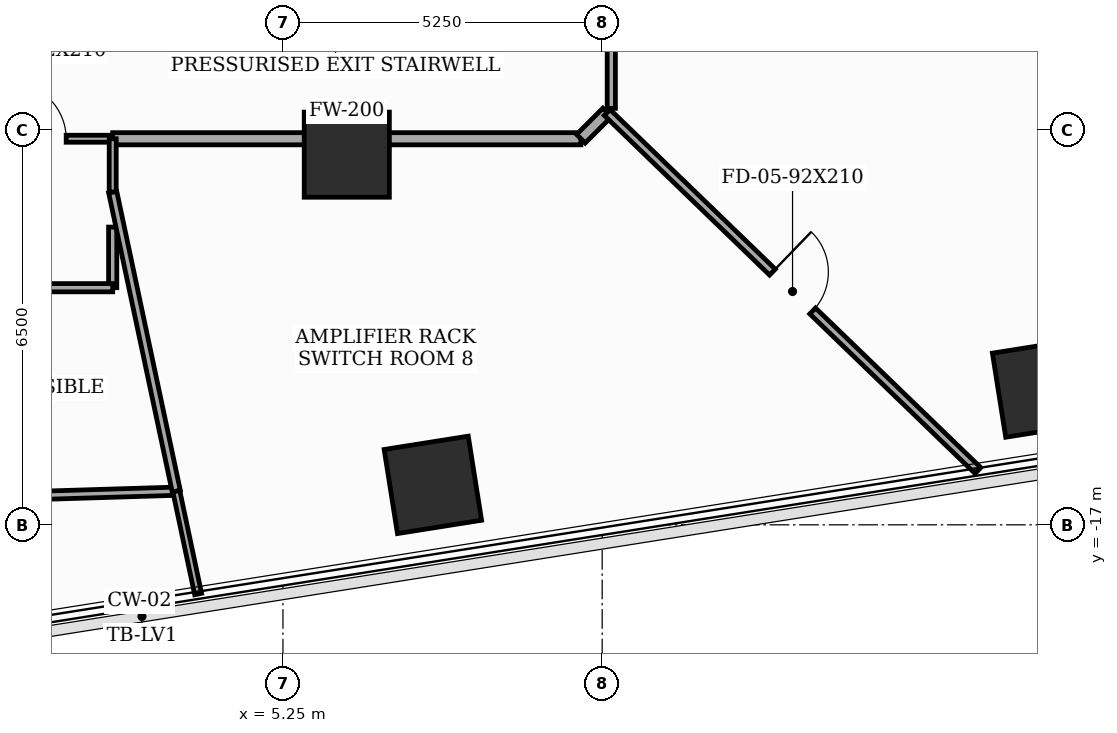
"""IFC4 building model, lengths in metres.
Left out: names, types, materials, properties, quantities, classifications, styles, units other than length and angle.
Written with IfcOpenShell. Run it as: python <this file> out.ifc"""

import sys

from ifc_helpers import new_model, si_unit, direction, frame, frame_2d, origin, origin_2d, place, context, subcontext, project, spatial, rectangle, extrude, element, fill, save


model = new_model("IFC4")
c1 = context("Model", 3, precision=1e-05, world=origin(), true_north=direction((0.0, 1.0)))
c2 = subcontext(c1, "Body", "Model", "MODEL_VIEW")
j1 = project(units=[si_unit("LENGTHUNIT", "METRE"), si_unit("PLANEANGLEUNIT", "RADIAN")], contexts=[c1])
p1 = place(None, origin())
s1 = spatial("IfcSite", under=j1, at=p1, CompositionType="ELEMENT")
p2 = place(p1, origin())
s2 = spatial("IfcBuilding", under=s1, at=p2, CompositionType="ELEMENT")
p3 = place(p2, frame((0.0, 0.0, 74.1)))
s3 = spatial("IfcBuildingStorey", under=s2, at=p3, CompositionType="ELEMENT", Elevation=74.1)
for number, where, z_axis, x_axis in (
    (1, (6.3, -10.912, 0.0), (0.0, 0.0, 1.0), (1.0, 0.0, 0.0)),
    (2, (7.716, -16.343, 0.0), (0.0, 0.0, 1.0), (0.988, 0.156, 0.0)),
    (3, (17.719, -14.758, 0.0), (0.0, 0.0, 1.0), (0.988, 0.156, 0.0)),
):
    element("IfcColumn", number, at=place(p3, frame(where, z_axis=z_axis, x_axis=x_axis)), inside=s3, PredefinedType="COLUMN", context=c2, shape_type="SweptSolid", body=[
        extrude(rectangle(XDim=1.4, YDim=1.4, at=origin_2d()), origin(), (0.0, 0.0, 1.0), 3.7),
    ])
p4 = place(p3, frame((10.65, -10.15, 0.0), z_axis=(0.0, 0.0, 1.0), x_axis=(0.0, 1.0, 0.0)))
e4 = element("IfcWall", 4, at=p4, inside=s3, PredefinedType="PARTITIONING", context=c2, shape_type="SweptSolid", body=[
    extrude(rectangle(XDim=6.158, YDim=0.135, at=frame_2d((3.079, 0.0))), origin(), (0.0, 0.0, 1.0), 2.785),
])
p5 = place(p3, frame((0.0, -10.65, 0.0), z_axis=(0.0, 0.0, 1.0), x_axis=(1.0, 0.0, 0.0)))
e5 = element("IfcWall", 5, at=p5, inside=s3, PredefinedType="PARTITIONING", context=c2, shape_type="SweptSolid", body=[
    extrude(rectangle(XDim=2.45, YDim=0.115, at=frame_2d((1.225, 0.0))), origin(), (0.0, 0.0, 1.0), 3.5),
])
p6 = place(p5, frame((0.765, 0.0, 0.0)))
e6 = element("IfcOpeningElement", 6, at=p6, cuts=e5, PredefinedType="OPENING", context=c2, shape_type="SweptSolid", body=[
    extrude(rectangle(XDim=0.92, YDim=2.1, at=frame_2d((0.46, 1.05))), frame((0.0, 0.067, 0.0), z_axis=(0.0, -1.0, 0.0), x_axis=(1.0, 0.0, 0.0)), (0.0, 0.0, 1.0), 0.135),
])
p7 = place(p3, frame((2.45, -10.65, 0.0), z_axis=(0.0, 0.0, 1.0), x_axis=(1.0, 0.0, 0.0)))
e7 = element("IfcWall", 7, at=p7, inside=s3, PredefinedType="SOLIDWALL", context=c2, shape_type="SweptSolid", body=[
    extrude(rectangle(XDim=7.7, YDim=0.2, at=frame_2d((3.85, 0.0))), origin(), (0.0, 0.0, 1.0), 2.785),
])
p8 = place(p3, frame((10.15, -10.65, 0.0), z_axis=(0.0, 0.0, 1.0), x_axis=(0.70730655707, 0.706906948845, 0.0)))
e8 = element("IfcWall", 8, at=p8, inside=s3, PredefinedType="SOLIDWALL", context=c2, shape_type="SweptSolid", body=[
    extrude(rectangle(XDim=0.611, YDim=0.2, at=frame_2d((0.305, 0.0))), origin(), (0.0, 0.0, 1.0), 3.5),
])
p9 = place(p3, frame((10.582, -10.218, 0.0), z_axis=(0.0, 0.0, 1.0), x_axis=(0.719282851578, -0.694717337789, 0.0)))
e9 = element("IfcWall", 9, at=p9, inside=s3, PredefinedType="PARTITIONING", context=c2, shape_type="SweptSolid", body=[
    extrude(rectangle(XDim=8.477, YDim=0.135, at=frame_2d((4.239, 0.0))), origin(), (0.0, 0.0, 1.0), 2.935),
])
p10 = place(p9, frame((3.779, 0.0, 0.0)))
e10 = element("IfcOpeningElement", 10, at=p10, cuts=e9, PredefinedType="OPENING", context=c2, shape_type="SweptSolid", body=[
    extrude(rectangle(XDim=0.92, YDim=2.1, at=frame_2d((0.46, 1.05))), frame((0.0, 0.077, 0.0), z_axis=(0.0, -1.0, 0.0), x_axis=(1.0, 0.0, 0.0)), (0.0, 0.0, 1.0), 0.155),
])
p11 = place(p3, frame((-2.935, -16.643, 0.0), z_axis=(0.0, 0.0, 1.0), x_axis=(0.999535697464, 0.030469484666, 0.0)))
e11 = element("IfcWall", 11, at=p11, inside=s3, PredefinedType="PARTITIONING", context=c2, shape_type="SweptSolid", body=[
    extrude(rectangle(XDim=6.434, YDim=0.135, at=frame_2d((3.217, 0.0))), origin(), (0.0, 0.0, 1.0), 2.785),
])
p12 = place(p3, frame((2.45, -12.103, 0.0), z_axis=(0.0, 0.0, 1.0), x_axis=(0.0, -1.0, 0.0)))
e12 = element("IfcWall", 12, at=p12, inside=s3, PredefinedType="PARTITIONING", context=c2, shape_type="SweptSolid", body=[
    extrude(rectangle(XDim=0.997, YDim=0.135, at=frame_2d((0.499, 0.0))), origin(), (0.0, 0.0, 1.0), 2.785),
])
p13 = place(p3, frame((2.45, -13.1, 0.0), z_axis=(0.0, 0.0, 1.0), x_axis=(-1.0, 0.0, 0.0)))
e13 = element("IfcWall", 13, at=p13, inside=s3, PredefinedType="PARTITIONING", context=c2, shape_type="SweptSolid", body=[
    extrude(rectangle(XDim=2.45, YDim=0.135, at=frame_2d((1.225, 0.0))), origin(), (0.0, 0.0, 1.0), 2.785),
])
p14 = place(p3, frame((3.496, -16.447, 0.0), z_axis=(0.0, 0.0, 1.0), x_axis=(-0.207934783689, 0.978142691908, 0.0)))
e14 = element("IfcWall", 14, at=p14, inside=s3, PredefinedType="PARTITIONING", context=c2, shape_type="SweptSolid", body=[
    extrude(rectangle(XDim=5.031, YDim=0.135, at=frame_2d((2.516, 0.0))), origin(), (0.0, 0.0, 1.0), 2.785),
])
p15 = place(p3, frame((3.855, -18.139, 0.0), z_axis=(0.0, 0.0, 1.0), x_axis=(-0.207667958155, 0.978199375974, 0.0)))
e15 = element("IfcWall", 15, at=p15, inside=s3, PredefinedType="PARTITIONING", context=c2, shape_type="SweptSolid", body=[
    extrude(rectangle(XDim=1.729, YDim=0.115, at=frame_2d((0.865, 0.0))), origin(), (0.0, 0.0, 1.0), 2.935),
])
p16 = place(p3, frame((2.45, -11.526, 0.0), z_axis=(0.0, 0.0, 1.0), x_axis=(0.0, 1.0, 0.0)))
e16 = element("IfcWall", 16, at=p16, inside=s3, PredefinedType="PARTITIONING", context=c2, shape_type="SweptSolid", body=[
    extrude(rectangle(XDim=0.876, YDim=0.115, at=frame_2d((0.438, 0.0))), origin(), (0.0, 0.0, 1.0), 3.5),
])
p17 = place(p6, origin())
e17 = element("IfcDoor", 17, at=p17, inside=s3, OperationType="SINGLE_SWING_LEFT", PredefinedType="DOOR", context=c2, shape_type="SweptSolid", body=[
    extrude(rectangle(XDim=0.92, YDim=2.1, at=frame_2d((0.46, 1.05))), frame((0.0, 0.025, 0.0), z_axis=(0.0, -1.0, 0.0), x_axis=(1.0, 0.0, 0.0)), (0.0, 0.0, 1.0), 0.05),
])
fill(e6, e17)
p18 = place(p10, origin())
e18 = element("IfcDoor", 18, at=p18, inside=s3, OperationType="SINGLE_SWING_LEFT", PredefinedType="DOOR", context=c2, shape_type="SweptSolid", body=[
    extrude(rectangle(XDim=0.92, YDim=2.1, at=frame_2d((0.46, 1.05))), frame((0.0, 0.025, 0.0), z_axis=(0.0, -1.0, 0.0), x_axis=(1.0, 0.0, 0.0)), (0.0, 0.0, 1.0), 0.05),
])
fill(e10, e18)
save(model, sys.argv[1])
